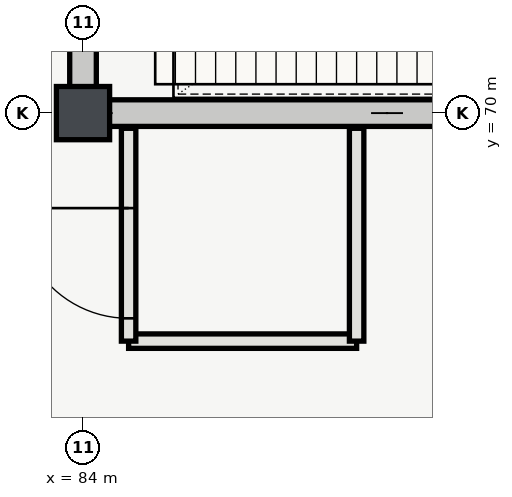
"""IFC4 building model, lengths in metres.
Left out: names, types, materials, properties, quantities, classifications, styles, units other than length and angle.
Written with IfcOpenShell. Run it as: python <this file> out.ifc"""

import sys

from ifc_helpers import new_model, si_unit, direction, frame, frame_2d, origin, origin_2d, place, context, subcontext, project, spatial, rectangle, extrude, element, fill, save


model = new_model("IFC4")
c1 = context("Model", 3, precision=1e-05, world=origin(), true_north=direction((0.0, 1.0)))
c2 = subcontext(c1, "Body", "Model", "MODEL_VIEW")
j1 = project(units=[si_unit("LENGTHUNIT", "METRE"), si_unit("PLANEANGLEUNIT", "RADIAN")], contexts=[c1])
p1 = place(None, origin())
s1 = spatial("IfcSite", under=j1, at=p1, CompositionType="ELEMENT")
p2 = place(p1, origin())
s2 = spatial("IfcBuilding", under=s1, at=p2, CompositionType="ELEMENT")
p3 = place(p2, origin())
s3 = spatial("IfcBuildingStorey", under=s2, at=p3, CompositionType="ELEMENT", Elevation=0.0)
p4 = place(p3, frame((84.0, 70.0, 0.0), z_axis=(0.0, 0.0, 1.0), x_axis=(1.0, 0.0, 0.0)))
e1 = element("IfcColumn", 1, at=p4, inside=s3, PredefinedType="COLUMN", context=c2, shape_type="SweptSolid", body=[
    extrude(rectangle(XDim=0.7, YDim=0.7, at=origin_2d()), origin(), (0.0, 0.0, 1.0), 5.4),
])
p5 = place(p3, frame((83.825, 70.0, 0.0), z_axis=(0.0, 0.0, 1.0), x_axis=(1.0, 0.0, 0.0)))
e2 = element("IfcWall", 2, at=p5, inside=s3, PredefinedType="SHEAR", context=c2, shape_type="SweptSolid", body=[
    extrude(rectangle(XDim=8.35, YDim=0.35, at=frame_2d((4.175, 0.0))), origin(), (0.0, 0.0, 1.0), 5.12),
])
p6 = place(p3, frame((84.0, 70.175, 0.0), z_axis=(0.0, 0.0, 1.0), x_axis=(0.0, 1.0, 0.0)))
e3 = element("IfcWall", 3, at=p6, inside=s3, PredefinedType="SHEAR", context=c2, shape_type="SweptSolid", body=[
    extrude(rectangle(XDim=7.65, YDim=0.35, at=frame_2d((3.825, 0.0))), origin(), (0.0, 0.0, 1.0), 5.12),
])
p7 = place(p6, frame((1.65, 0.0, 0.0)))
e4 = element("IfcOpeningElement", 4, at=p7, cuts=e3, PredefinedType="OPENING", context=c2, shape_type="SweptSolid", body=[
    extrude(rectangle(XDim=1.35, YDim=2.2, at=frame_2d((0.675, 1.1))), frame((0.0, 0.185, 0.0), z_axis=(0.0, -1.0, 0.0), x_axis=(1.0, 0.0, 0.0)), (0.0, 0.0, 1.0), 0.37),
])
p8 = place(p3, frame((84.6, 67.0, 0.0), z_axis=(0.0, 0.0, 1.0), x_axis=(1.0, 0.0, 0.0)))
e5 = element("IfcWall", 5, at=p8, inside=s3, PredefinedType="PARTITIONING", context=c2, shape_type="SweptSolid", body=[
    extrude(rectangle(XDim=3.0, YDim=0.19, at=frame_2d((1.5, 0.0))), origin(), (0.0, 0.0, 1.0), 5.12),
])
p9 = place(p3, frame((84.6, 69.8, 0.0), z_axis=(0.0, 0.0, 1.0), x_axis=(0.0, -1.0, 0.0)))
e6 = element("IfcWall", 6, at=p9, inside=s3, PredefinedType="PARTITIONING", context=c2, shape_type="SweptSolid", body=[
    extrude(rectangle(XDim=2.8, YDim=0.19, at=frame_2d((1.4, 0.0))), origin(), (0.0, 0.0, 1.0), 5.12),
])
p10 = place(p9, frame((1.05, 0.0, 0.0)))
e7 = element("IfcOpeningElement", 7, at=p10, cuts=e6, PredefinedType="OPENING", context=c2, shape_type="SweptSolid", body=[
    extrude(rectangle(XDim=1.45, YDim=2.2, at=frame_2d((0.725, 1.1))), frame((0.0, 0.105, 0.0), z_axis=(0.0, -1.0, 0.0), x_axis=(1.0, 0.0, 0.0)), (0.0, 0.0, 1.0), 0.21),
])
p11 = place(p3, frame((87.6, 67.0, 0.0), z_axis=(0.0, 0.0, 1.0), x_axis=(0.0, 1.0, 0.0)))
e8 = element("IfcWall", 8, at=p11, inside=s3, PredefinedType="PARTITIONING", context=c2, shape_type="SweptSolid", body=[
    extrude(rectangle(XDim=2.8, YDim=0.19, at=frame_2d((1.4, 0.0))), origin(), (0.0, 0.0, 1.0), 5.12),
])
p12 = place(p10, origin())
e9 = element("IfcDoor", 9, at=p12, inside=s3, OperationType="SINGLE_SWING_LEFT", PredefinedType="DOOR", context=c2, shape_type="SweptSolid", body=[
    extrude(rectangle(XDim=1.45, YDim=2.2, at=frame_2d((0.725, 1.1))), frame((0.0, 0.025, 0.0), z_axis=(0.0, -1.0, 0.0), x_axis=(1.0, 0.0, 0.0)), (0.0, 0.0, 1.0), 0.05),
])
fill(e7, e9)
save(model, sys.argv[1])
